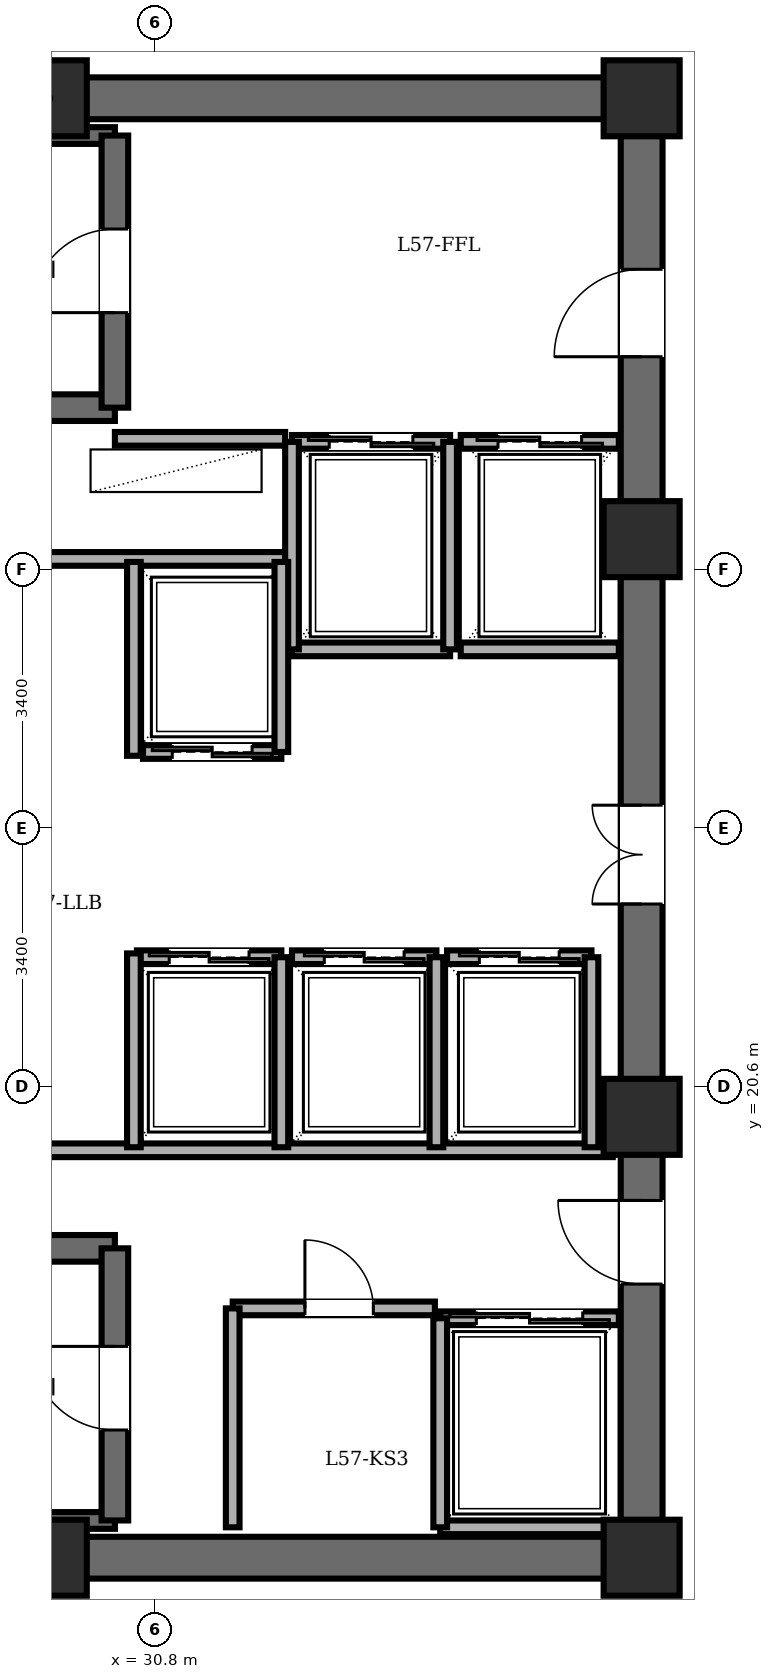
"""IFC4 building model, lengths in metres.
Left out: names, types, materials, properties, quantities, classifications, styles, units other than length and angle.
Written with IfcOpenShell. Run it as: python <this file> out.ifc"""

import sys

from ifc_helpers import new_model, si_unit, direction, frame, frame_2d, origin, origin_2d, place, context, subcontext, project, spatial, rectangle, extrude, element, fill, save


model = new_model("IFC4")
c1 = context("Model", 3, precision=1e-05, world=origin(), true_north=direction((0.0, 1.0)))
c2 = subcontext(c1, "Body", "Model", "MODEL_VIEW")
j1 = project(units=[si_unit("LENGTHUNIT", "METRE"), si_unit("PLANEANGLEUNIT", "RADIAN")], contexts=[c1])
p1 = place(None, origin())
s1 = spatial("IfcSite", under=j1, at=p1, CompositionType="ELEMENT")
p2 = place(p1, origin())
s2 = spatial("IfcBuilding", under=s1, at=p2, CompositionType="ELEMENT")
p3 = place(p2, frame((0.0, 0.0, 219.3)))
s3 = spatial("IfcBuildingStorey", under=s2, at=p3, CompositionType="ELEMENT", Elevation=219.3)
for number, where, z_axis, x_axis in (
    (1, (29.4, 14.4, 0.0), (0.0, 0.0, 1.0), (1.0, 0.0, 0.0)),
    (2, (37.2, 14.4, 0.0), (0.0, 0.0, 1.0), (1.0, 0.0, 0.0)),
    (3, (37.2, 20.2, 0.0), (0.0, 0.0, 1.0), (1.0, 0.0, 0.0)),
    (4, (37.2, 27.8, 0.0), (0.0, 0.0, 1.0), (1.0, 0.0, 0.0)),
    (5, (37.2, 33.6, 0.0), (0.0, 0.0, 1.0), (1.0, 0.0, 0.0)),
    (6, (29.4, 33.6, 0.0), (0.0, 0.0, 1.0), (1.0, 0.0, 0.0)),
):
    element("IfcColumn", number, at=place(p3, frame(where, z_axis=z_axis, x_axis=x_axis)), inside=s3, PredefinedType="COLUMN", context=c2, shape_type="SweptSolid", body=[
        extrude(rectangle(XDim=1.0, YDim=1.0, at=origin_2d()), origin(), (0.0, 0.0, 1.0), 3.6),
    ])
for number, where, z_axis, x_axis in (
    (7, (21.6, 33.6, 0.0), (0.0, 0.0, 1.0), (1.0, 0.0, 0.0)),
    (8, (37.2, 14.4, 0.0), (0.0, 0.0, 1.0), (-1.0, 0.0, 0.0)),
):
    element("IfcWall", number, at=place(p3, frame(where, z_axis=z_axis, x_axis=x_axis)), inside=s3, PredefinedType="SHEAR", context=c2, shape_type="SweptSolid", body=[
        extrude(rectangle(XDim=15.6, YDim=0.55, at=frame_2d((7.8, 0.0))), origin(), (0.0, 0.0, 1.0), 3.4),
    ])
p4 = place(p3, frame((37.2, 14.4, 0.0), z_axis=(0.0, 0.0, 1.0), x_axis=(0.0, 1.0, 0.0)))
e9 = element("IfcWall", 9, at=p4, inside=s3, PredefinedType="SHEAR", context=c2, shape_type="SweptSolid", body=[
    extrude(rectangle(XDim=19.2, YDim=0.55, at=frame_2d((9.6, 0.0))), origin(), (0.0, 0.0, 1.0), 3.4),
])
p5 = place(p4, frame((15.8, 0.0, 0.0)))
e10 = element("IfcOpeningElement", 10, at=p5, cuts=e9, PredefinedType="OPENING", context=c2, shape_type="SweptSolid", body=[
    extrude(rectangle(XDim=1.15, YDim=2.15, at=frame_2d((0.575, 1.075))), frame((0.0, 0.285, 0.0), z_axis=(0.0, -1.0, 0.0), x_axis=(1.0, 0.0, 0.0)), (0.0, 0.0, 1.0), 0.57),
])
p6 = place(p4, frame((3.6, 0.0, 0.0)))
e11 = element("IfcOpeningElement", 11, at=p6, cuts=e9, PredefinedType="OPENING", context=c2, shape_type="SweptSolid", body=[
    extrude(rectangle(XDim=1.1, YDim=2.15, at=frame_2d((0.55, 1.075))), frame((0.0, 0.285, 0.0), z_axis=(0.0, -1.0, 0.0), x_axis=(1.0, 0.0, 0.0)), (0.0, 0.0, 1.0), 0.57),
])
p7 = place(p4, frame((8.6, 0.0, 0.0)))
e12 = element("IfcOpeningElement", 12, at=p7, cuts=e9, PredefinedType="OPENING", context=c2, shape_type="SweptSolid", body=[
    extrude(rectangle(XDim=1.3, YDim=2.2, at=frame_2d((0.65, 1.1))), frame((0.0, 0.285, 0.0), z_axis=(0.0, -1.0, 0.0), x_axis=(1.0, 0.0, 0.0)), (0.0, 0.0, 1.0), 0.57),
])
p8 = place(p3, frame((22.48, 29.53, 0.0), z_axis=(0.0, 0.0, 1.0), x_axis=(1.0, 0.0, 0.0)))
e13 = element("IfcWall", 13, at=p8, inside=s3, PredefinedType="SOLIDWALL", context=c2, shape_type="SweptSolid", body=[
    extrude(rectangle(XDim=7.79, YDim=0.35, at=frame_2d((3.895, 0.0))), origin(), (0.0, 0.0, 1.0), 3.4),
])
p9 = place(p3, frame((22.48, 33.11, 0.0), z_axis=(0.0, 0.0, 1.0), x_axis=(1.0, 0.0, 0.0)))
e14 = element("IfcWall", 14, at=p9, inside=s3, PredefinedType="PARTITIONING", context=c2, shape_type="SweptSolid", body=[
    extrude(rectangle(XDim=7.79, YDim=0.22, at=frame_2d((3.895, 0.0))), origin(), (0.0, 0.0, 1.0), 3.4),
])
p10 = place(p3, frame((30.27, 29.53, 0.0), z_axis=(0.0, 0.0, 1.0), x_axis=(0.0, 1.0, 0.0)))
e15 = element("IfcWall", 15, at=p10, inside=s3, PredefinedType="SOLIDWALL", context=c2, shape_type="SweptSolid", body=[
    extrude(rectangle(XDim=3.58, YDim=0.35, at=frame_2d((1.79, 0.0))), origin(), (0.0, 0.0, 1.0), 3.4),
])
p11 = place(p10, frame((1.25, 0.0, 0.0)))
e16 = element("IfcOpeningElement", 16, at=p11, cuts=e15, PredefinedType="OPENING", context=c2, shape_type="SweptSolid", body=[
    extrude(rectangle(XDim=1.1, YDim=2.15, at=frame_2d((0.55, 1.075))), frame((0.0, 0.185, 0.0), z_axis=(0.0, -1.0, 0.0), x_axis=(1.0, 0.0, 0.0)), (0.0, 0.0, 1.0), 0.37),
])
p12 = place(p3, frame((22.48, 18.47, 0.0), z_axis=(0.0, 0.0, 1.0), x_axis=(1.0, 0.0, 0.0)))
e17 = element("IfcWall", 17, at=p12, inside=s3, PredefinedType="SOLIDWALL", context=c2, shape_type="SweptSolid", body=[
    extrude(rectangle(XDim=7.79, YDim=0.35, at=frame_2d((3.895, 0.0))), origin(), (0.0, 0.0, 1.0), 3.4),
])
p13 = place(p3, frame((22.48, 14.89, 0.0), z_axis=(0.0, 0.0, 1.0), x_axis=(1.0, 0.0, 0.0)))
e18 = element("IfcWall", 18, at=p13, inside=s3, PredefinedType="PARTITIONING", context=c2, shape_type="SweptSolid", body=[
    extrude(rectangle(XDim=7.79, YDim=0.22, at=frame_2d((3.895, 0.0))), origin(), (0.0, 0.0, 1.0), 3.4),
])
p14 = place(p3, frame((30.27, 14.89, 0.0), z_axis=(0.0, 0.0, 1.0), x_axis=(0.0, 1.0, 0.0)))
e19 = element("IfcWall", 19, at=p14, inside=s3, PredefinedType="SOLIDWALL", context=c2, shape_type="SweptSolid", body=[
    extrude(rectangle(XDim=3.58, YDim=0.35, at=frame_2d((1.79, 0.0))), origin(), (0.0, 0.0, 1.0), 3.4),
])
p15 = place(p14, frame((1.19, 0.0, 0.0)))
e20 = element("IfcOpeningElement", 20, at=p15, cuts=e19, PredefinedType="OPENING", context=c2, shape_type="SweptSolid", body=[
    extrude(rectangle(XDim=1.1, YDim=2.15, at=frame_2d((0.55, 1.075))), frame((0.0, 0.185, 0.0), z_axis=(0.0, -1.0, 0.0), x_axis=(1.0, 0.0, 0.0)), (0.0, 0.0, 1.0), 0.37),
])
p16 = place(p3, frame((30.27, 29.12, 0.0), z_axis=(0.0, 0.0, 1.0), x_axis=(1.0, 0.0, 0.0)))
e21 = element("IfcWall", 21, at=p16, inside=s3, PredefinedType="PARTITIONING", context=c2, shape_type="SweptSolid", body=[
    extrude(rectangle(XDim=2.24, YDim=0.18, at=frame_2d((1.12, 0.0))), origin(), (0.0, 0.0, 1.0), 3.4),
])
p17 = place(p3, frame((21.95, 27.54, 0.0), z_axis=(0.0, 0.0, 1.0), x_axis=(1.0, 0.0, 0.0)))
e22 = element("IfcWall", 22, at=p17, inside=s3, PredefinedType="PARTITIONING", context=c2, shape_type="SweptSolid", body=[
    extrude(rectangle(XDim=10.56, YDim=0.18, at=frame_2d((5.28, 0.0))), origin(), (0.0, 0.0, 1.0), 3.4),
])
p18 = place(p3, frame((21.95, 19.76, 0.0), z_axis=(0.0, 0.0, 1.0), x_axis=(1.0, 0.0, 0.0)))
e23 = element("IfcWall", 23, at=p18, inside=s3, PredefinedType="PARTITIONING", context=c2, shape_type="SweptSolid", body=[
    extrude(rectangle(XDim=14.87, YDim=0.18, at=frame_2d((7.435, 0.0))), origin(), (0.0, 0.0, 1.0), 3.4),
])
p19 = place(p3, frame((31.82, 17.68, 0.0), z_axis=(0.0, 0.0, 1.0), x_axis=(1.0, 0.0, 0.0)))
e24 = element("IfcWall", 24, at=p19, inside=s3, PredefinedType="PARTITIONING", context=c2, shape_type="SweptSolid", body=[
    extrude(rectangle(XDim=2.66, YDim=0.18, at=frame_2d((1.33, 0.0))), origin(), (0.0, 0.0, 1.0), 3.4),
])
p20 = place(p19, frame((0.95, 0.0, 0.0)))
e25 = element("IfcOpeningElement", 25, at=p20, cuts=e24, PredefinedType="OPENING", context=c2, shape_type="SweptSolid", body=[
    extrude(rectangle(XDim=0.9, YDim=2.05, at=frame_2d((0.45, 1.025))), frame((0.0, 0.1, 0.0), z_axis=(0.0, -1.0, 0.0), x_axis=(1.0, 0.0, 0.0)), (0.0, 0.0, 1.0), 0.2),
])
p21 = place(p3, frame((31.82, 14.8, 0.0), z_axis=(0.0, 0.0, 1.0), x_axis=(0.0, 1.0, 0.0)))
e26 = element("IfcWall", 26, at=p21, inside=s3, PredefinedType="PARTITIONING", context=c2, shape_type="SweptSolid", body=[
    extrude(rectangle(XDim=2.88, YDim=0.18, at=frame_2d((1.44, 0.0))), origin(), (0.0, 0.0, 1.0), 3.4),
])
p22 = place(p3, frame((32.6, 29.08, 0.0), z_axis=(0.0, 0.0, 1.0), x_axis=(1.0, 0.0, 0.0)))
e27 = element("IfcWall", 27, at=p22, inside=s3, PredefinedType="PARTITIONING", context=c2, shape_type="SweptSolid", body=[
    extrude(rectangle(XDim=2.08, YDim=0.18, at=frame_2d((1.04, 0.0))), origin(), (0.0, 0.0, 1.0), 3.4),
])
p23 = place(p22, frame((0.49, 0.0, 0.0)))
e28 = element("IfcOpeningElement", 28, at=p23, cuts=e27, PredefinedType="OPENING", context=c2, shape_type="SweptSolid", body=[
    extrude(rectangle(XDim=1.1, YDim=2.2, at=frame_2d((0.55, 1.1))), frame((0.0, 0.1, 0.0), z_axis=(0.0, -1.0, 0.0), x_axis=(1.0, 0.0, 0.0)), (0.0, 0.0, 1.0), 0.2),
])
p24 = place(p3, frame((34.68, 26.35, 0.0), z_axis=(0.0, 0.0, 1.0), x_axis=(-1.0, 0.0, 0.0)))
e29 = element("IfcWall", 29, at=p24, inside=s3, PredefinedType="PARTITIONING", context=c2, shape_type="SweptSolid", body=[
    extrude(rectangle(XDim=2.08, YDim=0.18, at=frame_2d((1.04, 0.0))), origin(), (0.0, 0.0, 1.0), 3.4),
])
for number, where, z_axis, x_axis in (
    (30, (34.68, 26.35, 0.0), (0.0, 0.0, 1.0), (0.0, 1.0, 0.0)),
    (31, (32.6, 29.08, 0.0), (0.0, 0.0, 1.0), (0.0, -1.0, 0.0)),
):
    element("IfcWall", number, at=place(p3, frame(where, z_axis=z_axis, x_axis=x_axis)), inside=s3, PredefinedType="PARTITIONING", context=c2, shape_type="SweptSolid", body=[
        extrude(rectangle(XDim=2.73, YDim=0.18, at=frame_2d((1.365, 0.0))), origin(), (0.0, 0.0, 1.0), 3.4),
    ])
p25 = place(p3, frame((34.82, 29.08, 0.0), z_axis=(0.0, 0.0, 1.0), x_axis=(1.0, 0.0, 0.0)))
e32 = element("IfcWall", 32, at=p25, inside=s3, PredefinedType="PARTITIONING", context=c2, shape_type="SweptSolid", body=[
    extrude(rectangle(XDim=2.08, YDim=0.18, at=frame_2d((1.04, 0.0))), origin(), (0.0, 0.0, 1.0), 3.4),
])
p26 = place(p25, frame((0.49, 0.0, 0.0)))
e33 = element("IfcOpeningElement", 33, at=p26, cuts=e32, PredefinedType="OPENING", context=c2, shape_type="SweptSolid", body=[
    extrude(rectangle(XDim=1.1, YDim=2.2, at=frame_2d((0.55, 1.1))), frame((0.0, 0.1, 0.0), z_axis=(0.0, -1.0, 0.0), x_axis=(1.0, 0.0, 0.0)), (0.0, 0.0, 1.0), 0.2),
])
p27 = place(p3, frame((36.9, 26.35, 0.0), z_axis=(0.0, 0.0, 1.0), x_axis=(-1.0, 0.0, 0.0)))
e34 = element("IfcWall", 34, at=p27, inside=s3, PredefinedType="PARTITIONING", context=c2, shape_type="SweptSolid", body=[
    extrude(rectangle(XDim=2.08, YDim=0.18, at=frame_2d((1.04, 0.0))), origin(), (0.0, 0.0, 1.0), 3.4),
])
p28 = place(p3, frame((34.55, 17.55, 0.0), z_axis=(0.0, 0.0, 1.0), x_axis=(1.0, 0.0, 0.0)))
e35 = element("IfcWall", 35, at=p28, inside=s3, PredefinedType="PARTITIONING", context=c2, shape_type="SweptSolid", body=[
    extrude(rectangle(XDim=2.35, YDim=0.18, at=frame_2d((1.175, 0.0))), origin(), (0.0, 0.0, 1.0), 3.4),
])
p29 = place(p28, frame((0.475, 0.0, 0.0)))
e36 = element("IfcOpeningElement", 36, at=p29, cuts=e35, PredefinedType="OPENING", context=c2, shape_type="SweptSolid", body=[
    extrude(rectangle(XDim=1.4, YDim=2.3, at=frame_2d((0.7, 1.15))), frame((0.0, 0.1, 0.0), z_axis=(0.0, -1.0, 0.0), x_axis=(1.0, 0.0, 0.0)), (0.0, 0.0, 1.0), 0.2),
])
p30 = place(p3, frame((36.9, 14.8, 0.0), z_axis=(0.0, 0.0, 1.0), x_axis=(-1.0, 0.0, 0.0)))
e37 = element("IfcWall", 37, at=p30, inside=s3, PredefinedType="PARTITIONING", context=c2, shape_type="SweptSolid", body=[
    extrude(rectangle(XDim=2.35, YDim=0.18, at=frame_2d((1.175, 0.0))), origin(), (0.0, 0.0, 1.0), 3.4),
])
p31 = place(p3, frame((34.55, 17.55, 0.0), z_axis=(0.0, 0.0, 1.0), x_axis=(0.0, -1.0, 0.0)))
e38 = element("IfcWall", 38, at=p31, inside=s3, PredefinedType="PARTITIONING", context=c2, shape_type="SweptSolid", body=[
    extrude(rectangle(XDim=2.75, YDim=0.18, at=frame_2d((1.375, 0.0))), origin(), (0.0, 0.0, 1.0), 3.4),
])
p32 = place(p3, frame((32.46, 25.0, 0.0), z_axis=(0.0, 0.0, 1.0), x_axis=(-1.0, 0.0, 0.0)))
e39 = element("IfcWall", 39, at=p32, inside=s3, PredefinedType="PARTITIONING", context=c2, shape_type="SweptSolid", body=[
    extrude(rectangle(XDim=1.82, YDim=0.18, at=frame_2d((0.91, 0.0))), origin(), (0.0, 0.0, 1.0), 3.4),
])
p33 = place(p32, frame((0.385, 0.0, 0.0)))
e40 = element("IfcOpeningElement", 40, at=p33, cuts=e39, PredefinedType="OPENING", context=c2, shape_type="SweptSolid", body=[
    extrude(rectangle(XDim=1.05, YDim=2.2, at=frame_2d((0.525, 1.1))), frame((0.0, 0.1, 0.0), z_axis=(0.0, -1.0, 0.0), x_axis=(1.0, 0.0, 0.0)), (0.0, 0.0, 1.0), 0.2),
])
p34 = place(p3, frame((32.46, 25.0, 0.0), z_axis=(0.0, 0.0, 1.0), x_axis=(0.0, 1.0, 0.0)))
e41 = element("IfcWall", 41, at=p34, inside=s3, PredefinedType="PARTITIONING", context=c2, shape_type="SweptSolid", body=[
    extrude(rectangle(XDim=2.5, YDim=0.18, at=frame_2d((1.25, 0.0))), origin(), (0.0, 0.0, 1.0), 3.4),
])
p35 = place(p3, frame((30.56, 22.3, 0.0), z_axis=(0.0, 0.0, 1.0), x_axis=(1.0, 0.0, 0.0)))
e42 = element("IfcWall", 42, at=p35, inside=s3, PredefinedType="PARTITIONING", context=c2, shape_type="SweptSolid", body=[
    extrude(rectangle(XDim=1.9, YDim=0.18, at=frame_2d((0.95, 0.0))), origin(), (0.0, 0.0, 1.0), 3.4),
])
p36 = place(p35, frame((0.425, 0.0, 0.0)))
e43 = element("IfcOpeningElement", 43, at=p36, cuts=e42, PredefinedType="OPENING", context=c2, shape_type="SweptSolid", body=[
    extrude(rectangle(XDim=1.05, YDim=2.2, at=frame_2d((0.525, 1.1))), frame((0.0, 0.1, 0.0), z_axis=(0.0, -1.0, 0.0), x_axis=(1.0, 0.0, 0.0)), (0.0, 0.0, 1.0), 0.2),
])
p37 = place(p3, frame((32.46, 19.8, 0.0), z_axis=(0.0, 0.0, 1.0), x_axis=(0.0, 1.0, 0.0)))
e44 = element("IfcWall", 44, at=p37, inside=s3, PredefinedType="PARTITIONING", context=c2, shape_type="SweptSolid", body=[
    extrude(rectangle(XDim=2.5, YDim=0.18, at=frame_2d((1.25, 0.0))), origin(), (0.0, 0.0, 1.0), 3.4),
])
p38 = place(p3, frame((32.6, 22.3, 0.0), z_axis=(0.0, 0.0, 1.0), x_axis=(1.0, 0.0, 0.0)))
e45 = element("IfcWall", 45, at=p38, inside=s3, PredefinedType="PARTITIONING", context=c2, shape_type="SweptSolid", body=[
    extrude(rectangle(XDim=1.9, YDim=0.18, at=frame_2d((0.95, 0.0))), origin(), (0.0, 0.0, 1.0), 3.4),
])
p39 = place(p38, frame((0.425, 0.0, 0.0)))
e46 = element("IfcOpeningElement", 46, at=p39, cuts=e45, PredefinedType="OPENING", context=c2, shape_type="SweptSolid", body=[
    extrude(rectangle(XDim=1.05, YDim=2.2, at=frame_2d((0.525, 1.1))), frame((0.0, 0.1, 0.0), z_axis=(0.0, -1.0, 0.0), x_axis=(1.0, 0.0, 0.0)), (0.0, 0.0, 1.0), 0.2),
])
p40 = place(p3, frame((34.5, 19.8, 0.0), z_axis=(0.0, 0.0, 1.0), x_axis=(0.0, 1.0, 0.0)))
e47 = element("IfcWall", 47, at=p40, inside=s3, PredefinedType="PARTITIONING", context=c2, shape_type="SweptSolid", body=[
    extrude(rectangle(XDim=2.5, YDim=0.18, at=frame_2d((1.25, 0.0))), origin(), (0.0, 0.0, 1.0), 3.4),
])
p41 = place(p3, frame((34.64, 22.3, 0.0), z_axis=(0.0, 0.0, 1.0), x_axis=(1.0, 0.0, 0.0)))
e48 = element("IfcWall", 48, at=p41, inside=s3, PredefinedType="PARTITIONING", context=c2, shape_type="SweptSolid", body=[
    extrude(rectangle(XDim=1.9, YDim=0.18, at=frame_2d((0.95, 0.0))), origin(), (0.0, 0.0, 1.0), 3.4),
])
p42 = place(p41, frame((0.425, 0.0, 0.0)))
e49 = element("IfcOpeningElement", 49, at=p42, cuts=e48, PredefinedType="OPENING", context=c2, shape_type="SweptSolid", body=[
    extrude(rectangle(XDim=1.05, YDim=2.2, at=frame_2d((0.525, 1.1))), frame((0.0, 0.1, 0.0), z_axis=(0.0, -1.0, 0.0), x_axis=(1.0, 0.0, 0.0)), (0.0, 0.0, 1.0), 0.2),
])
p43 = place(p3, frame((36.54, 19.8, 0.0), z_axis=(0.0, 0.0, 1.0), x_axis=(0.0, 1.0, 0.0)))
e50 = element("IfcWall", 50, at=p43, inside=s3, PredefinedType="PARTITIONING", context=c2, shape_type="SweptSolid", body=[
    extrude(rectangle(XDim=2.5, YDim=0.18, at=frame_2d((1.25, 0.0))), origin(), (0.0, 0.0, 1.0), 3.4),
])
for number, where, z_axis, x_axis in (
    (51, (30.52, 24.95, 0.0), (0.0, 0.0, 1.0), (0.0, 1.0, 0.0)),
    (52, (30.52, 19.8, 0.0), (0.0, 0.0, 1.0), (0.0, 1.0, 0.0)),
):
    element("IfcWall", number, at=place(p3, frame(where, z_axis=z_axis, x_axis=x_axis)), inside=s3, PredefinedType="PARTITIONING", context=c2, shape_type="SweptSolid", body=[
        extrude(rectangle(XDim=2.55, YDim=0.18, at=frame_2d((1.275, 0.0))), origin(), (0.0, 0.0, 1.0), 3.4),
    ])
p44 = place(p11, origin())
e53 = element("IfcDoor", 53, at=p44, inside=s3, OperationType="SINGLE_SWING_LEFT", PredefinedType="DOOR", context=c2, shape_type="SweptSolid", body=[
    extrude(rectangle(XDim=1.1, YDim=2.15, at=frame_2d((0.55, 1.075))), frame((0.0, 0.025, 0.0), z_axis=(0.0, -1.0, 0.0), x_axis=(1.0, 0.0, 0.0)), (0.0, 0.0, 1.0), 0.05),
])
fill(e16, e53)
p45 = place(p15, origin())
e54 = element("IfcDoor", 54, at=p45, inside=s3, OperationType="SINGLE_SWING_RIGHT", PredefinedType="DOOR", context=c2, shape_type="SweptSolid", body=[
    extrude(rectangle(XDim=1.1, YDim=2.15, at=frame_2d((0.55, 1.075))), frame((0.0, 0.025, 0.0), z_axis=(0.0, -1.0, 0.0), x_axis=(1.0, 0.0, 0.0)), (0.0, 0.0, 1.0), 0.05),
])
fill(e20, e54)
p46 = place(p5, origin())
e55 = element("IfcDoor", 55, at=p46, inside=s3, OperationType="SINGLE_SWING_LEFT", PredefinedType="DOOR", context=c2, shape_type="SweptSolid", body=[
    extrude(rectangle(XDim=1.15, YDim=2.15, at=frame_2d((0.575, 1.075))), frame((0.0, 0.025, 0.0), z_axis=(0.0, -1.0, 0.0), x_axis=(1.0, 0.0, 0.0)), (0.0, 0.0, 1.0), 0.05),
])
fill(e10, e55)
p47 = place(p6, origin())
e56 = element("IfcDoor", 56, at=p47, inside=s3, OperationType="SINGLE_SWING_RIGHT", PredefinedType="DOOR", context=c2, shape_type="SweptSolid", body=[
    extrude(rectangle(XDim=1.1, YDim=2.15, at=frame_2d((0.55, 1.075))), frame((0.0, 0.025, 0.0), z_axis=(0.0, -1.0, 0.0), x_axis=(1.0, 0.0, 0.0)), (0.0, 0.0, 1.0), 0.05),
])
fill(e11, e56)
p48 = place(p20, origin())
e57 = element("IfcDoor", 57, at=p48, inside=s3, OperationType="SINGLE_SWING_LEFT", PredefinedType="DOOR", context=c2, shape_type="SweptSolid", body=[
    extrude(rectangle(XDim=0.9, YDim=2.05, at=frame_2d((0.45, 1.025))), frame((0.0, 0.025, 0.0), z_axis=(0.0, -1.0, 0.0), x_axis=(1.0, 0.0, 0.0)), (0.0, 0.0, 1.0), 0.05),
])
fill(e25, e57)
p49 = place(p23, origin())
e58 = element("IfcDoor", 58, at=p49, inside=s3, OperationType="DOUBLE_DOOR_SLIDING", PredefinedType="DOOR", context=c2, shape_type="SweptSolid", body=[
    extrude(rectangle(XDim=1.1, YDim=2.2, at=frame_2d((0.55, 1.1))), frame((0.0, 0.025, 0.0), z_axis=(0.0, -1.0, 0.0), x_axis=(1.0, 0.0, 0.0)), (0.0, 0.0, 1.0), 0.05),
])
fill(e28, e58)
p50 = place(p26, origin())
e59 = element("IfcDoor", 59, at=p50, inside=s3, OperationType="DOUBLE_DOOR_SLIDING", PredefinedType="DOOR", context=c2, shape_type="SweptSolid", body=[
    extrude(rectangle(XDim=1.1, YDim=2.2, at=frame_2d((0.55, 1.1))), frame((0.0, 0.025, 0.0), z_axis=(0.0, -1.0, 0.0), x_axis=(1.0, 0.0, 0.0)), (0.0, 0.0, 1.0), 0.05),
])
fill(e33, e59)
p51 = place(p29, origin())
e60 = element("IfcDoor", 60, at=p51, inside=s3, OperationType="DOUBLE_DOOR_SLIDING", PredefinedType="DOOR", context=c2, shape_type="SweptSolid", body=[
    extrude(rectangle(XDim=1.4, YDim=2.3, at=frame_2d((0.7, 1.15))), frame((0.0, 0.025, 0.0), z_axis=(0.0, -1.0, 0.0), x_axis=(1.0, 0.0, 0.0)), (0.0, 0.0, 1.0), 0.05),
])
fill(e36, e60)
p52 = place(p33, origin())
e61 = element("IfcDoor", 61, at=p52, inside=s3, OperationType="DOUBLE_DOOR_SLIDING", PredefinedType="DOOR", context=c2, shape_type="SweptSolid", body=[
    extrude(rectangle(XDim=1.05, YDim=2.2, at=frame_2d((0.525, 1.1))), frame((0.0, 0.025, 0.0), z_axis=(0.0, -1.0, 0.0), x_axis=(1.0, 0.0, 0.0)), (0.0, 0.0, 1.0), 0.05),
])
fill(e40, e61)
p53 = place(p36, origin())
e62 = element("IfcDoor", 62, at=p53, inside=s3, OperationType="DOUBLE_DOOR_SLIDING", PredefinedType="DOOR", context=c2, shape_type="SweptSolid", body=[
    extrude(rectangle(XDim=1.05, YDim=2.2, at=frame_2d((0.525, 1.1))), frame((0.0, 0.025, 0.0), z_axis=(0.0, -1.0, 0.0), x_axis=(1.0, 0.0, 0.0)), (0.0, 0.0, 1.0), 0.05),
])
fill(e43, e62)
p54 = place(p39, origin())
e63 = element("IfcDoor", 63, at=p54, inside=s3, OperationType="DOUBLE_DOOR_SLIDING", PredefinedType="DOOR", context=c2, shape_type="SweptSolid", body=[
    extrude(rectangle(XDim=1.05, YDim=2.2, at=frame_2d((0.525, 1.1))), frame((0.0, 0.025, 0.0), z_axis=(0.0, -1.0, 0.0), x_axis=(1.0, 0.0, 0.0)), (0.0, 0.0, 1.0), 0.05),
])
fill(e46, e63)
p55 = place(p42, origin())
e64 = element("IfcDoor", 64, at=p55, inside=s3, OperationType="DOUBLE_DOOR_SLIDING", PredefinedType="DOOR", context=c2, shape_type="SweptSolid", body=[
    extrude(rectangle(XDim=1.05, YDim=2.2, at=frame_2d((0.525, 1.1))), frame((0.0, 0.025, 0.0), z_axis=(0.0, -1.0, 0.0), x_axis=(1.0, 0.0, 0.0)), (0.0, 0.0, 1.0), 0.05),
])
fill(e49, e64)
p56 = place(p7, origin())
e65 = element("IfcDoor", 65, at=p56, inside=s3, OperationType="DOUBLE_DOOR_SINGLE_SWING", PredefinedType="DOOR", context=c2, shape_type="SweptSolid", body=[
    extrude(rectangle(XDim=1.3, YDim=2.2, at=frame_2d((0.65, 1.1))), frame((0.0, 0.025, 0.0), z_axis=(0.0, -1.0, 0.0), x_axis=(1.0, 0.0, 0.0)), (0.0, 0.0, 1.0), 0.05),
])
fill(e12, e65)
save(model, sys.argv[1])
